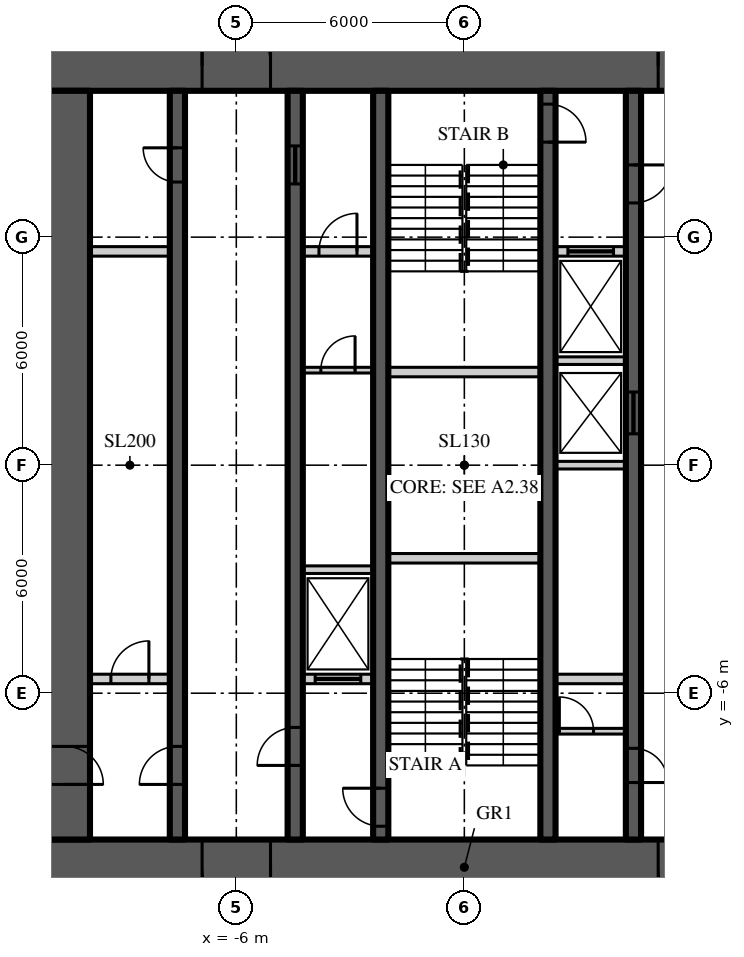
"""IFC4 building model, lengths in metres.
Left out: names, types, materials, properties, quantities, classifications, styles, units other than length and angle.
Written with IfcOpenShell. Run it as: python <this file> out.ifc"""

import sys

from ifc_helpers import new_model, si_unit, direction, frame, frame_2d, origin, place, context, subcontext, project, spatial, rectangle, extrude, element, fill, save


model = new_model("IFC4")
c1 = context("Model", 3, precision=1e-05, world=origin(), true_north=direction((0.0, 1.0)))
c2 = subcontext(c1, "Body", "Model", "MODEL_VIEW")
j1 = project(units=[si_unit("LENGTHUNIT", "METRE"), si_unit("PLANEANGLEUNIT", "RADIAN")], contexts=[c1])
p1 = place(None, origin())
s1 = spatial("IfcSite", under=j1, at=p1, CompositionType="ELEMENT")
p2 = place(p1, origin())
s2 = spatial("IfcBuilding", under=s1, at=p2, CompositionType="ELEMENT")
p3 = place(p2, frame((0.0, 0.0, 298.5)))
s3 = spatial("IfcBuildingStorey", under=s2, at=p3, CompositionType="ELEMENT", Elevation=298.5)
p4 = place(p3, frame((-11.15, 10.5, 0.0), z_axis=(0.0, 0.0, 1.0), x_axis=(1.0, 0.0, 0.0)))
e1 = element("IfcWall", 1, at=p4, inside=s3, PredefinedType="SHEAR", context=c2, shape_type="SweptSolid", body=[
    extrude(rectangle(XDim=22.3, YDim=1.3, at=frame_2d((11.15, 0.0))), origin(), (0.0, 0.0, 1.0), 3.9),
])
p5 = place(p4, frame((4.25, 0.0, 0.0)))
e2 = element("IfcOpeningElement", 2, at=p5, cuts=e1, PredefinedType="OPENING", context=c2, shape_type="SweptSolid", body=[
    extrude(rectangle(XDim=1.8, YDim=2.2, at=frame_2d((0.9, 1.1))), frame((0.0, 0.66, 0.0), z_axis=(0.0, -1.0, 0.0), x_axis=(1.0, 0.0, 0.0)), (0.0, 0.0, 1.0), 1.32),
])
p6 = place(p4, frame((16.25, 0.0, 0.0)))
e3 = element("IfcOpeningElement", 3, at=p6, cuts=e1, PredefinedType="OPENING", context=c2, shape_type="SweptSolid", body=[
    extrude(rectangle(XDim=1.8, YDim=2.2, at=frame_2d((0.9, 1.1))), frame((0.0, 0.66, 0.0), z_axis=(0.0, -1.0, 0.0), x_axis=(1.0, 0.0, 0.0)), (0.0, 0.0, 1.0), 1.32),
])
p7 = place(p3, frame((11.15, -10.5, 0.0), z_axis=(0.0, 0.0, 1.0), x_axis=(-1.0, 0.0, 0.0)))
e4 = element("IfcWall", 4, at=p7, inside=s3, PredefinedType="SHEAR", context=c2, shape_type="SweptSolid", body=[
    extrude(rectangle(XDim=22.3, YDim=1.3, at=frame_2d((11.15, 0.0))), origin(), (0.0, 0.0, 1.0), 3.9),
])
p8 = place(p7, frame((16.25, 0.0, 0.0)))
e5 = element("IfcOpeningElement", 5, at=p8, cuts=e4, PredefinedType="OPENING", context=c2, shape_type="SweptSolid", body=[
    extrude(rectangle(XDim=1.8, YDim=2.2, at=frame_2d((0.9, 1.1))), frame((0.0, 0.66, 0.0), z_axis=(0.0, -1.0, 0.0), x_axis=(1.0, 0.0, 0.0)), (0.0, 0.0, 1.0), 1.32),
])
p9 = place(p7, frame((4.25, 0.0, 0.0)))
e6 = element("IfcOpeningElement", 6, at=p9, cuts=e4, PredefinedType="OPENING", context=c2, shape_type="SweptSolid", body=[
    extrude(rectangle(XDim=1.8, YDim=2.2, at=frame_2d((0.9, 1.1))), frame((0.0, 0.66, 0.0), z_axis=(0.0, -1.0, 0.0), x_axis=(1.0, 0.0, 0.0)), (0.0, 0.0, 1.0), 1.32),
])
p10 = place(p3, frame((-10.5, 9.85, 0.0), z_axis=(0.0, 0.0, 1.0), x_axis=(0.0, -1.0, 0.0)))
e7 = element("IfcWall", 7, at=p10, inside=s3, PredefinedType="SHEAR", context=c2, shape_type="SweptSolid", body=[
    extrude(rectangle(XDim=19.7, YDim=1.3, at=frame_2d((9.85, 0.0))), origin(), (0.0, 0.0, 1.0), 3.9),
])
p11 = place(p10, frame((17.25, 0.0, 0.0)))
e8 = element("IfcOpeningElement", 8, at=p11, cuts=e7, PredefinedType="OPENING", context=c2, shape_type="SweptSolid", body=[
    extrude(rectangle(XDim=1.0, YDim=2.2, at=frame_2d((0.5, 1.1))), frame((0.0, 0.66, 0.0), z_axis=(0.0, -1.0, 0.0), x_axis=(1.0, 0.0, 0.0)), (0.0, 0.0, 1.0), 1.32),
])
p12 = place(p3, frame((-7.55, -9.85, 0.0), z_axis=(0.0, 0.0, 1.0), x_axis=(0.0, 1.0, 0.0)))
e9 = element("IfcWall", 9, at=p12, inside=s3, PredefinedType="SHEAR", context=c2, shape_type="SweptSolid", body=[
    extrude(rectangle(XDim=19.7, YDim=0.4, at=frame_2d((9.85, 0.0))), origin(), (0.0, 0.0, 1.0), 3.9),
])
p13 = place(p12, frame((1.45, 0.0, 0.0)))
e10 = element("IfcOpeningElement", 10, at=p13, cuts=e9, PredefinedType="OPENING", context=c2, shape_type="SweptSolid", body=[
    extrude(rectangle(XDim=1.0, YDim=2.2, at=frame_2d((0.5, 1.1))), frame((0.0, 0.21, 0.0), z_axis=(0.0, -1.0, 0.0), x_axis=(1.0, 0.0, 0.0)), (0.0, 0.0, 1.0), 0.42),
])
p14 = place(p12, frame((17.3, 0.0, 0.0)))
e11 = element("IfcOpeningElement", 11, at=p14, cuts=e9, PredefinedType="OPENING", context=c2, shape_type="SweptSolid", body=[
    extrude(rectangle(XDim=0.9, YDim=2.1, at=frame_2d((0.45, 1.05))), frame((0.0, 0.21, 0.0), z_axis=(0.0, -1.0, 0.0), x_axis=(1.0, 0.0, 0.0)), (0.0, 0.0, 1.0), 0.42),
])
p15 = place(p3, frame((-4.45, -9.85, 0.0), z_axis=(0.0, 0.0, 1.0), x_axis=(0.0, 1.0, 0.0)))
e12 = element("IfcWall", 12, at=p15, inside=s3, PredefinedType="SHEAR", context=c2, shape_type="SweptSolid", body=[
    extrude(rectangle(XDim=19.7, YDim=0.4, at=frame_2d((9.85, 0.0))), origin(), (0.0, 0.0, 1.0), 3.9),
])
p16 = place(p15, frame((1.95, 0.0, 0.0)))
e13 = element("IfcOpeningElement", 13, at=p16, cuts=e12, PredefinedType="OPENING", context=c2, shape_type="SweptSolid", body=[
    extrude(rectangle(XDim=1.0, YDim=2.2, at=frame_2d((0.5, 1.1))), frame((0.0, 0.21, 0.0), z_axis=(0.0, -1.0, 0.0), x_axis=(1.0, 0.0, 0.0)), (0.0, 0.0, 1.0), 0.42),
])
p17 = place(p15, frame((17.25, 0.0, 0.0)))
e14 = element("IfcOpeningElement", 14, at=p17, cuts=e12, PredefinedType="OPENING", context=c2, shape_type="SweptSolid", body=[
    extrude(rectangle(XDim=1.0, YDim=2.1, at=frame_2d((0.5, 1.05))), frame((0.0, 0.21, 0.0), z_axis=(0.0, -1.0, 0.0), x_axis=(1.0, 0.0, 0.0)), (0.0, 0.0, 1.0), 0.42),
])
p18 = place(p3, frame((4.45, 9.85, 0.0), z_axis=(0.0, 0.0, 1.0), x_axis=(0.0, -1.0, 0.0)))
e15 = element("IfcWall", 15, at=p18, inside=s3, PredefinedType="SHEAR", context=c2, shape_type="SweptSolid", body=[
    extrude(rectangle(XDim=19.7, YDim=0.4, at=frame_2d((9.85, 0.0))), origin(), (0.0, 0.0, 1.0), 3.9),
])
p19 = place(p18, frame((1.95, 0.0, 0.0)))
e16 = element("IfcOpeningElement", 16, at=p19, cuts=e15, PredefinedType="OPENING", context=c2, shape_type="SweptSolid", body=[
    extrude(rectangle(XDim=1.0, YDim=2.2, at=frame_2d((0.5, 1.1))), frame((0.0, 0.21, 0.0), z_axis=(0.0, -1.0, 0.0), x_axis=(1.0, 0.0, 0.0)), (0.0, 0.0, 1.0), 0.42),
])
p20 = place(p18, frame((17.3, 0.0, 0.0)))
e17 = element("IfcOpeningElement", 17, at=p20, cuts=e15, PredefinedType="OPENING", context=c2, shape_type="SweptSolid", body=[
    extrude(rectangle(XDim=0.9, YDim=2.1, at=frame_2d((0.45, 1.05))), frame((0.0, 0.21, 0.0), z_axis=(0.0, -1.0, 0.0), x_axis=(1.0, 0.0, 0.0)), (0.0, 0.0, 1.0), 0.42),
])
p21 = place(p18, frame((7.925, 0.0, 0.0)))
e18 = element("IfcOpeningElement", 18, at=p21, cuts=e15, PredefinedType="OPENING", context=c2, shape_type="SweptSolid", body=[
    extrude(rectangle(XDim=1.1, YDim=2.2, at=frame_2d((0.55, 1.1))), frame((0.0, 0.21, 0.0), z_axis=(0.0, -1.0, 0.0), x_axis=(1.0, 0.0, 0.0)), (0.0, 0.0, 1.0), 0.42),
])
p22 = place(p3, frame((-2.2, -9.85, 0.0), z_axis=(0.0, 0.0, 1.0), x_axis=(0.0, 1.0, 0.0)))
e19 = element("IfcWall", 19, at=p22, inside=s3, PredefinedType="SHEAR", context=c2, shape_type="SweptSolid", body=[
    extrude(rectangle(XDim=19.7, YDim=0.4, at=frame_2d((9.85, 0.0))), origin(), (0.0, 0.0, 1.0), 3.9),
])
p23 = place(p22, frame((0.35, 0.0, 0.0)))
e20 = element("IfcOpeningElement", 20, at=p23, cuts=e19, PredefinedType="OPENING", context=c2, shape_type="SweptSolid", body=[
    extrude(rectangle(XDim=1.0, YDim=2.2, at=frame_2d((0.5, 1.1))), frame((0.0, 0.21, 0.0), z_axis=(0.0, -1.0, 0.0), x_axis=(1.0, 0.0, 0.0)), (0.0, 0.0, 1.0), 0.42),
])
p24 = place(p3, frame((2.2, 9.85, 0.0), z_axis=(0.0, 0.0, 1.0), x_axis=(0.0, -1.0, 0.0)))
e21 = element("IfcWall", 21, at=p24, inside=s3, PredefinedType="SHEAR", context=c2, shape_type="SweptSolid", body=[
    extrude(rectangle(XDim=19.7, YDim=0.4, at=frame_2d((9.85, 0.0))), origin(), (0.0, 0.0, 1.0), 3.9),
])
p25 = place(p24, frame((0.35, 0.0, 0.0)))
e22 = element("IfcOpeningElement", 22, at=p25, cuts=e21, PredefinedType="OPENING", context=c2, shape_type="SweptSolid", body=[
    extrude(rectangle(XDim=1.0, YDim=2.2, at=frame_2d((0.5, 1.1))), frame((0.0, 0.21, 0.0), z_axis=(0.0, -1.0, 0.0), x_axis=(1.0, 0.0, 0.0)), (0.0, 0.0, 1.0), 0.42),
])
p26 = place(p3, frame((-9.85, 5.625, 0.0), z_axis=(0.0, 0.0, 1.0), x_axis=(1.0, 0.0, 0.0)))
e23 = element("IfcWall", 23, at=p26, inside=s3, PredefinedType="SOLIDWALL", context=c2, shape_type="SweptSolid", body=[
    extrude(rectangle(XDim=2.1, YDim=0.25, at=frame_2d((1.05, 0.0))), origin(), (0.0, 0.0, 1.0), 3.7),
])
p27 = place(p3, frame((-4.25, 5.625, 0.0), z_axis=(0.0, 0.0, 1.0), x_axis=(1.0, 0.0, 0.0)))
e24 = element("IfcWall", 24, at=p27, inside=s3, PredefinedType="SOLIDWALL", context=c2, shape_type="SweptSolid", body=[
    extrude(rectangle(XDim=1.85, YDim=0.25, at=frame_2d((0.925, 0.0))), origin(), (0.0, 0.0, 1.0), 3.7),
])
p28 = place(p27, frame((0.425, 0.0, 0.0)))
e25 = element("IfcOpeningElement", 25, at=p28, cuts=e24, PredefinedType="OPENING", context=c2, shape_type="SweptSolid", body=[
    extrude(rectangle(XDim=1.0, YDim=2.2, at=frame_2d((0.5, 1.1))), frame((0.0, 0.135, 0.0), z_axis=(0.0, -1.0, 0.0), x_axis=(1.0, 0.0, 0.0)), (0.0, 0.0, 1.0), 0.27),
])
p29 = place(p3, frame((2.4, 5.625, 0.0), z_axis=(0.0, 0.0, 1.0), x_axis=(1.0, 0.0, 0.0)))
e26 = element("IfcWall", 26, at=p29, inside=s3, PredefinedType="SOLIDWALL", context=c2, shape_type="SweptSolid", body=[
    extrude(rectangle(XDim=1.85, YDim=0.25, at=frame_2d((0.925, 0.0))), origin(), (0.0, 0.0, 1.0), 3.7),
])
p30 = place(p29, frame((0.325, 0.0, 0.0)))
e27 = element("IfcOpeningElement", 27, at=p30, cuts=e26, PredefinedType="OPENING", context=c2, shape_type="SweptSolid", body=[
    extrude(rectangle(XDim=1.2, YDim=2.2, at=frame_2d((0.6, 1.1))), frame((0.0, 0.135, 0.0), z_axis=(0.0, -1.0, 0.0), x_axis=(1.0, 0.0, 0.0)), (0.0, 0.0, 1.0), 0.27),
])
p31 = place(p3, frame((-9.85, -5.625, 0.0), z_axis=(0.0, 0.0, 1.0), x_axis=(1.0, 0.0, 0.0)))
e28 = element("IfcWall", 28, at=p31, inside=s3, PredefinedType="SOLIDWALL", context=c2, shape_type="SweptSolid", body=[
    extrude(rectangle(XDim=2.1, YDim=0.25, at=frame_2d((1.05, 0.0))), origin(), (0.0, 0.0, 1.0), 3.7),
])
p32 = place(p31, frame((0.55, 0.0, 0.0)))
e29 = element("IfcOpeningElement", 29, at=p32, cuts=e28, PredefinedType="OPENING", context=c2, shape_type="SweptSolid", body=[
    extrude(rectangle(XDim=1.0, YDim=2.2, at=frame_2d((0.5, 1.1))), frame((0.0, 0.135, 0.0), z_axis=(0.0, -1.0, 0.0), x_axis=(1.0, 0.0, 0.0)), (0.0, 0.0, 1.0), 0.27),
])
p33 = place(p3, frame((-4.25, -5.625, 0.0), z_axis=(0.0, 0.0, 1.0), x_axis=(1.0, 0.0, 0.0)))
e30 = element("IfcWall", 30, at=p33, inside=s3, PredefinedType="SOLIDWALL", context=c2, shape_type="SweptSolid", body=[
    extrude(rectangle(XDim=1.85, YDim=0.25, at=frame_2d((0.925, 0.0))), origin(), (0.0, 0.0, 1.0), 3.7),
])
p34 = place(p33, frame((0.325, 0.0, 0.0)))
e31 = element("IfcOpeningElement", 31, at=p34, cuts=e30, PredefinedType="OPENING", context=c2, shape_type="SweptSolid", body=[
    extrude(rectangle(XDim=1.2, YDim=2.2, at=frame_2d((0.6, 1.1))), frame((0.0, 0.135, 0.0), z_axis=(0.0, -1.0, 0.0), x_axis=(1.0, 0.0, 0.0)), (0.0, 0.0, 1.0), 0.27),
])
p35 = place(p3, frame((2.4, -5.625, 0.0), z_axis=(0.0, 0.0, 1.0), x_axis=(1.0, 0.0, 0.0)))
e32 = element("IfcWall", 32, at=p35, inside=s3, PredefinedType="SOLIDWALL", context=c2, shape_type="SweptSolid", body=[
    extrude(rectangle(XDim=1.85, YDim=0.25, at=frame_2d((0.925, 0.0))), origin(), (0.0, 0.0, 1.0), 3.7),
])
for number, where, z_axis, x_axis in (
    (33, (-2.0, -2.45, 0.0), (0.0, 0.0, 1.0), (1.0, 0.0, 0.0)),
    (34, (-2.0, 2.45, 0.0), (0.0, 0.0, 1.0), (1.0, 0.0, 0.0)),
):
    element("IfcWall", number, at=place(p3, frame(where, z_axis=z_axis, x_axis=x_axis)), inside=s3, PredefinedType="SOLIDWALL", context=c2, shape_type="SweptSolid", body=[
        extrude(rectangle(XDim=4.0, YDim=0.25, at=frame_2d((2.0, 0.0))), origin(), (0.0, 0.0, 1.0), 3.7),
    ])
for number, where, z_axis, x_axis in (
    (35, (-4.25, -2.75, 0.0), (0.0, 0.0, 1.0), (1.0, 0.0, 0.0)),
    (36, (2.4, 0.0, 0.0), (0.0, 0.0, 1.0), (1.0, 0.0, 0.0)),
    (37, (2.4, 2.75, 0.0), (0.0, 0.0, 1.0), (1.0, 0.0, 0.0)),
):
    element("IfcWall", number, at=place(p3, frame(where, z_axis=z_axis, x_axis=x_axis)), inside=s3, PredefinedType="SOLIDWALL", context=c2, shape_type="SweptSolid", body=[
        extrude(rectangle(XDim=1.85, YDim=0.2, at=frame_2d((0.925, 0.0))), origin(), (0.0, 0.0, 1.0), 3.7),
    ])
p36 = place(p3, frame((-4.25, 2.5, 0.0), z_axis=(0.0, 0.0, 1.0), x_axis=(1.0, 0.0, 0.0)))
e38 = element("IfcWall", 38, at=p36, inside=s3, PredefinedType="SOLIDWALL", context=c2, shape_type="SweptSolid", body=[
    extrude(rectangle(XDim=1.85, YDim=0.15, at=frame_2d((0.925, 0.0))), origin(), (0.0, 0.0, 1.0), 3.77),
])
p37 = place(p36, frame((0.475, 0.0, 0.0)))
e39 = element("IfcOpeningElement", 39, at=p37, cuts=e38, PredefinedType="OPENING", context=c2, shape_type="SweptSolid", body=[
    extrude(rectangle(XDim=0.9, YDim=2.1, at=frame_2d((0.45, 1.05))), frame((0.0, 0.085, 0.0), z_axis=(0.0, -1.0, 0.0), x_axis=(1.0, 0.0, 0.0)), (0.0, 0.0, 1.0), 0.17),
])
p38 = place(p3, frame((2.4, -7.0, 0.0), z_axis=(0.0, 0.0, 1.0), x_axis=(1.0, 0.0, 0.0)))
e40 = element("IfcWall", 40, at=p38, inside=s3, PredefinedType="SOLIDWALL", context=c2, shape_type="SweptSolid", body=[
    extrude(rectangle(XDim=1.85, YDim=0.15, at=frame_2d((0.925, 0.0))), origin(), (0.0, 0.0, 1.0), 3.77),
])
p39 = place(p38, frame((0.1, 0.0, 0.0)))
e41 = element("IfcOpeningElement", 41, at=p39, cuts=e40, PredefinedType="OPENING", context=c2, shape_type="SweptSolid", body=[
    extrude(rectangle(XDim=0.9, YDim=2.1, at=frame_2d((0.45, 1.05))), frame((0.0, 0.085, 0.0), z_axis=(0.0, -1.0, 0.0), x_axis=(1.0, 0.0, 0.0)), (0.0, 0.0, 1.0), 0.17),
])
p40 = place(p5, origin())
e42 = element("IfcDoor", 42, at=p40, inside=s3, OperationType="DOUBLE_DOOR_DOUBLE_SWING", PredefinedType="DOOR", context=c2, shape_type="SweptSolid", body=[
    extrude(rectangle(XDim=1.8, YDim=2.2, at=frame_2d((0.9, 1.1))), frame((0.0, 0.025, 0.0), z_axis=(0.0, -1.0, 0.0), x_axis=(1.0, 0.0, 0.0)), (0.0, 0.0, 1.0), 0.05),
])
fill(e2, e42)
p41 = place(p8, origin())
e43 = element("IfcDoor", 43, at=p41, inside=s3, OperationType="DOUBLE_DOOR_DOUBLE_SWING", PredefinedType="DOOR", context=c2, shape_type="SweptSolid", body=[
    extrude(rectangle(XDim=1.8, YDim=2.2, at=frame_2d((0.9, 1.1))), frame((0.0, 0.025, 0.0), z_axis=(0.0, -1.0, 0.0), x_axis=(1.0, 0.0, 0.0)), (0.0, 0.0, 1.0), 0.05),
])
fill(e5, e43)
p42 = place(p6, origin())
e44 = element("IfcDoor", 44, at=p42, inside=s3, OperationType="DOUBLE_DOOR_DOUBLE_SWING", PredefinedType="DOOR", context=c2, shape_type="SweptSolid", body=[
    extrude(rectangle(XDim=1.8, YDim=2.2, at=frame_2d((0.9, 1.1))), frame((0.0, 0.025, 0.0), z_axis=(0.0, -1.0, 0.0), x_axis=(1.0, 0.0, 0.0)), (0.0, 0.0, 1.0), 0.05),
])
fill(e3, e44)
p43 = place(p9, origin())
e45 = element("IfcDoor", 45, at=p43, inside=s3, OperationType="DOUBLE_DOOR_DOUBLE_SWING", PredefinedType="DOOR", context=c2, shape_type="SweptSolid", body=[
    extrude(rectangle(XDim=1.8, YDim=2.2, at=frame_2d((0.9, 1.1))), frame((0.0, 0.025, 0.0), z_axis=(0.0, -1.0, 0.0), x_axis=(1.0, 0.0, 0.0)), (0.0, 0.0, 1.0), 0.05),
])
fill(e6, e45)
p44 = place(p13, origin())
e46 = element("IfcDoor", 46, at=p44, inside=s3, OperationType="SINGLE_SWING_LEFT", PredefinedType="DOOR", context=c2, shape_type="SweptSolid", body=[
    extrude(rectangle(XDim=1.0, YDim=2.2, at=frame_2d((0.5, 1.1))), frame((0.0, 0.025, 0.0), z_axis=(0.0, -1.0, 0.0), x_axis=(1.0, 0.0, 0.0)), (0.0, 0.0, 1.0), 0.05),
])
fill(e10, e46)
p45 = place(p11, origin())
e47 = element("IfcDoor", 47, at=p45, inside=s3, OperationType="SINGLE_SWING_RIGHT", PredefinedType="DOOR", context=c2, shape_type="SweptSolid", body=[
    extrude(rectangle(XDim=1.0, YDim=2.2, at=frame_2d((0.5, 1.1))), frame((0.0, 0.025, 0.0), z_axis=(0.0, -1.0, 0.0), x_axis=(1.0, 0.0, 0.0)), (0.0, 0.0, 1.0), 0.05),
])
fill(e8, e47)
p46 = place(p16, origin())
e48 = element("IfcDoor", 48, at=p46, inside=s3, OperationType="SINGLE_SWING_LEFT", PredefinedType="DOOR", context=c2, shape_type="SweptSolid", body=[
    extrude(rectangle(XDim=1.0, YDim=2.2, at=frame_2d((0.5, 1.1))), frame((0.0, 0.025, 0.0), z_axis=(0.0, -1.0, 0.0), x_axis=(1.0, 0.0, 0.0)), (0.0, 0.0, 1.0), 0.05),
])
fill(e13, e48)
p47 = place(p23, origin())
e49 = element("IfcDoor", 49, at=p47, inside=s3, OperationType="SINGLE_SWING_RIGHT", PredefinedType="DOOR", context=c2, shape_type="SweptSolid", body=[
    extrude(rectangle(XDim=1.0, YDim=2.2, at=frame_2d((0.5, 1.1))), frame((0.0, 0.025, 0.0), z_axis=(0.0, -1.0, 0.0), x_axis=(1.0, 0.0, 0.0)), (0.0, 0.0, 1.0), 0.05),
])
fill(e20, e49)
p48 = place(p19, origin())
e50 = element("IfcDoor", 50, at=p48, inside=s3, OperationType="SINGLE_SWING_LEFT", PredefinedType="DOOR", context=c2, shape_type="SweptSolid", body=[
    extrude(rectangle(XDim=1.0, YDim=2.2, at=frame_2d((0.5, 1.1))), frame((0.0, 0.025, 0.0), z_axis=(0.0, -1.0, 0.0), x_axis=(1.0, 0.0, 0.0)), (0.0, 0.0, 1.0), 0.05),
])
fill(e16, e50)
p49 = place(p25, origin())
e51 = element("IfcDoor", 51, at=p49, inside=s3, OperationType="SINGLE_SWING_RIGHT", PredefinedType="DOOR", context=c2, shape_type="SweptSolid", body=[
    extrude(rectangle(XDim=1.0, YDim=2.2, at=frame_2d((0.5, 1.1))), frame((0.0, 0.025, 0.0), z_axis=(0.0, -1.0, 0.0), x_axis=(1.0, 0.0, 0.0)), (0.0, 0.0, 1.0), 0.05),
])
fill(e22, e51)
p50 = place(p14, origin())
e52 = element("IfcDoor", 52, at=p50, inside=s3, OperationType="SINGLE_SWING_RIGHT", PredefinedType="DOOR", context=c2, shape_type="SweptSolid", body=[
    extrude(rectangle(XDim=0.9, YDim=2.1, at=frame_2d((0.45, 1.05))), frame((0.0, 0.025, 0.0), z_axis=(0.0, -1.0, 0.0), x_axis=(1.0, 0.0, 0.0)), (0.0, 0.0, 1.0), 0.05),
])
fill(e11, e52)
p51 = place(p17, origin())
e53 = element("IfcDoor", 53, at=p51, inside=s3, OperationType="SLIDING_TO_LEFT", PredefinedType="DOOR", context=c2, shape_type="SweptSolid", body=[
    extrude(rectangle(XDim=1.0, YDim=2.1, at=frame_2d((0.5, 1.05))), frame((0.0, 0.025, 0.0), z_axis=(0.0, -1.0, 0.0), x_axis=(1.0, 0.0, 0.0)), (0.0, 0.0, 1.0), 0.05),
])
fill(e14, e53)
p52 = place(p20, origin())
e54 = element("IfcDoor", 54, at=p52, inside=s3, OperationType="SINGLE_SWING_RIGHT", PredefinedType="DOOR", context=c2, shape_type="SweptSolid", body=[
    extrude(rectangle(XDim=0.9, YDim=2.1, at=frame_2d((0.45, 1.05))), frame((0.0, 0.025, 0.0), z_axis=(0.0, -1.0, 0.0), x_axis=(1.0, 0.0, 0.0)), (0.0, 0.0, 1.0), 0.05),
])
fill(e17, e54)
p53 = place(p21, origin())
e55 = element("IfcDoor", 55, at=p53, inside=s3, OperationType="SLIDING_TO_LEFT", PredefinedType="DOOR", context=c2, shape_type="SweptSolid", body=[
    extrude(rectangle(XDim=1.1, YDim=2.2, at=frame_2d((0.55, 1.1))), frame((0.0, 0.025, 0.0), z_axis=(0.0, -1.0, 0.0), x_axis=(1.0, 0.0, 0.0)), (0.0, 0.0, 1.0), 0.05),
])
fill(e18, e55)
p54 = place(p34, origin())
e56 = element("IfcDoor", 56, at=p54, inside=s3, OperationType="SLIDING_TO_LEFT", PredefinedType="DOOR", context=c2, shape_type="SweptSolid", body=[
    extrude(rectangle(XDim=1.2, YDim=2.2, at=frame_2d((0.6, 1.1))), frame((0.0, 0.025, 0.0), z_axis=(0.0, -1.0, 0.0), x_axis=(1.0, 0.0, 0.0)), (0.0, 0.0, 1.0), 0.05),
])
fill(e31, e56)
p55 = place(p30, origin())
e57 = element("IfcDoor", 57, at=p55, inside=s3, OperationType="SLIDING_TO_LEFT", PredefinedType="DOOR", context=c2, shape_type="SweptSolid", body=[
    extrude(rectangle(XDim=1.2, YDim=2.2, at=frame_2d((0.6, 1.1))), frame((0.0, 0.025, 0.0), z_axis=(0.0, -1.0, 0.0), x_axis=(1.0, 0.0, 0.0)), (0.0, 0.0, 1.0), 0.05),
])
fill(e27, e57)
p56 = place(p32, origin())
e58 = element("IfcDoor", 58, at=p56, inside=s3, OperationType="SINGLE_SWING_RIGHT", PredefinedType="DOOR", context=c2, shape_type="SweptSolid", body=[
    extrude(rectangle(XDim=1.0, YDim=2.2, at=frame_2d((0.5, 1.1))), frame((0.0, 0.025, 0.0), z_axis=(0.0, -1.0, 0.0), x_axis=(1.0, 0.0, 0.0)), (0.0, 0.0, 1.0), 0.05),
])
fill(e29, e58)
p57 = place(p37, origin())
e59 = element("IfcDoor", 59, at=p57, inside=s3, OperationType="SINGLE_SWING_RIGHT", PredefinedType="DOOR", context=c2, shape_type="SweptSolid", body=[
    extrude(rectangle(XDim=0.9, YDim=2.1, at=frame_2d((0.45, 1.05))), frame((0.0, 0.025, 0.0), z_axis=(0.0, -1.0, 0.0), x_axis=(1.0, 0.0, 0.0)), (0.0, 0.0, 1.0), 0.05),
])
fill(e39, e59)
p58 = place(p28, origin())
e60 = element("IfcDoor", 60, at=p58, inside=s3, OperationType="SINGLE_SWING_RIGHT", PredefinedType="DOOR", context=c2, shape_type="SweptSolid", body=[
    extrude(rectangle(XDim=1.0, YDim=2.2, at=frame_2d((0.5, 1.1))), frame((0.0, 0.025, 0.0), z_axis=(0.0, -1.0, 0.0), x_axis=(1.0, 0.0, 0.0)), (0.0, 0.0, 1.0), 0.05),
])
fill(e25, e60)
p59 = place(p39, origin())
e61 = element("IfcDoor", 61, at=p59, inside=s3, OperationType="SINGLE_SWING_LEFT", PredefinedType="DOOR", context=c2, shape_type="SweptSolid", body=[
    extrude(rectangle(XDim=0.9, YDim=2.1, at=frame_2d((0.45, 1.05))), frame((0.0, 0.025, 0.0), z_axis=(0.0, -1.0, 0.0), x_axis=(1.0, 0.0, 0.0)), (0.0, 0.0, 1.0), 0.05),
])
fill(e41, e61)
save(model, sys.argv[1])
